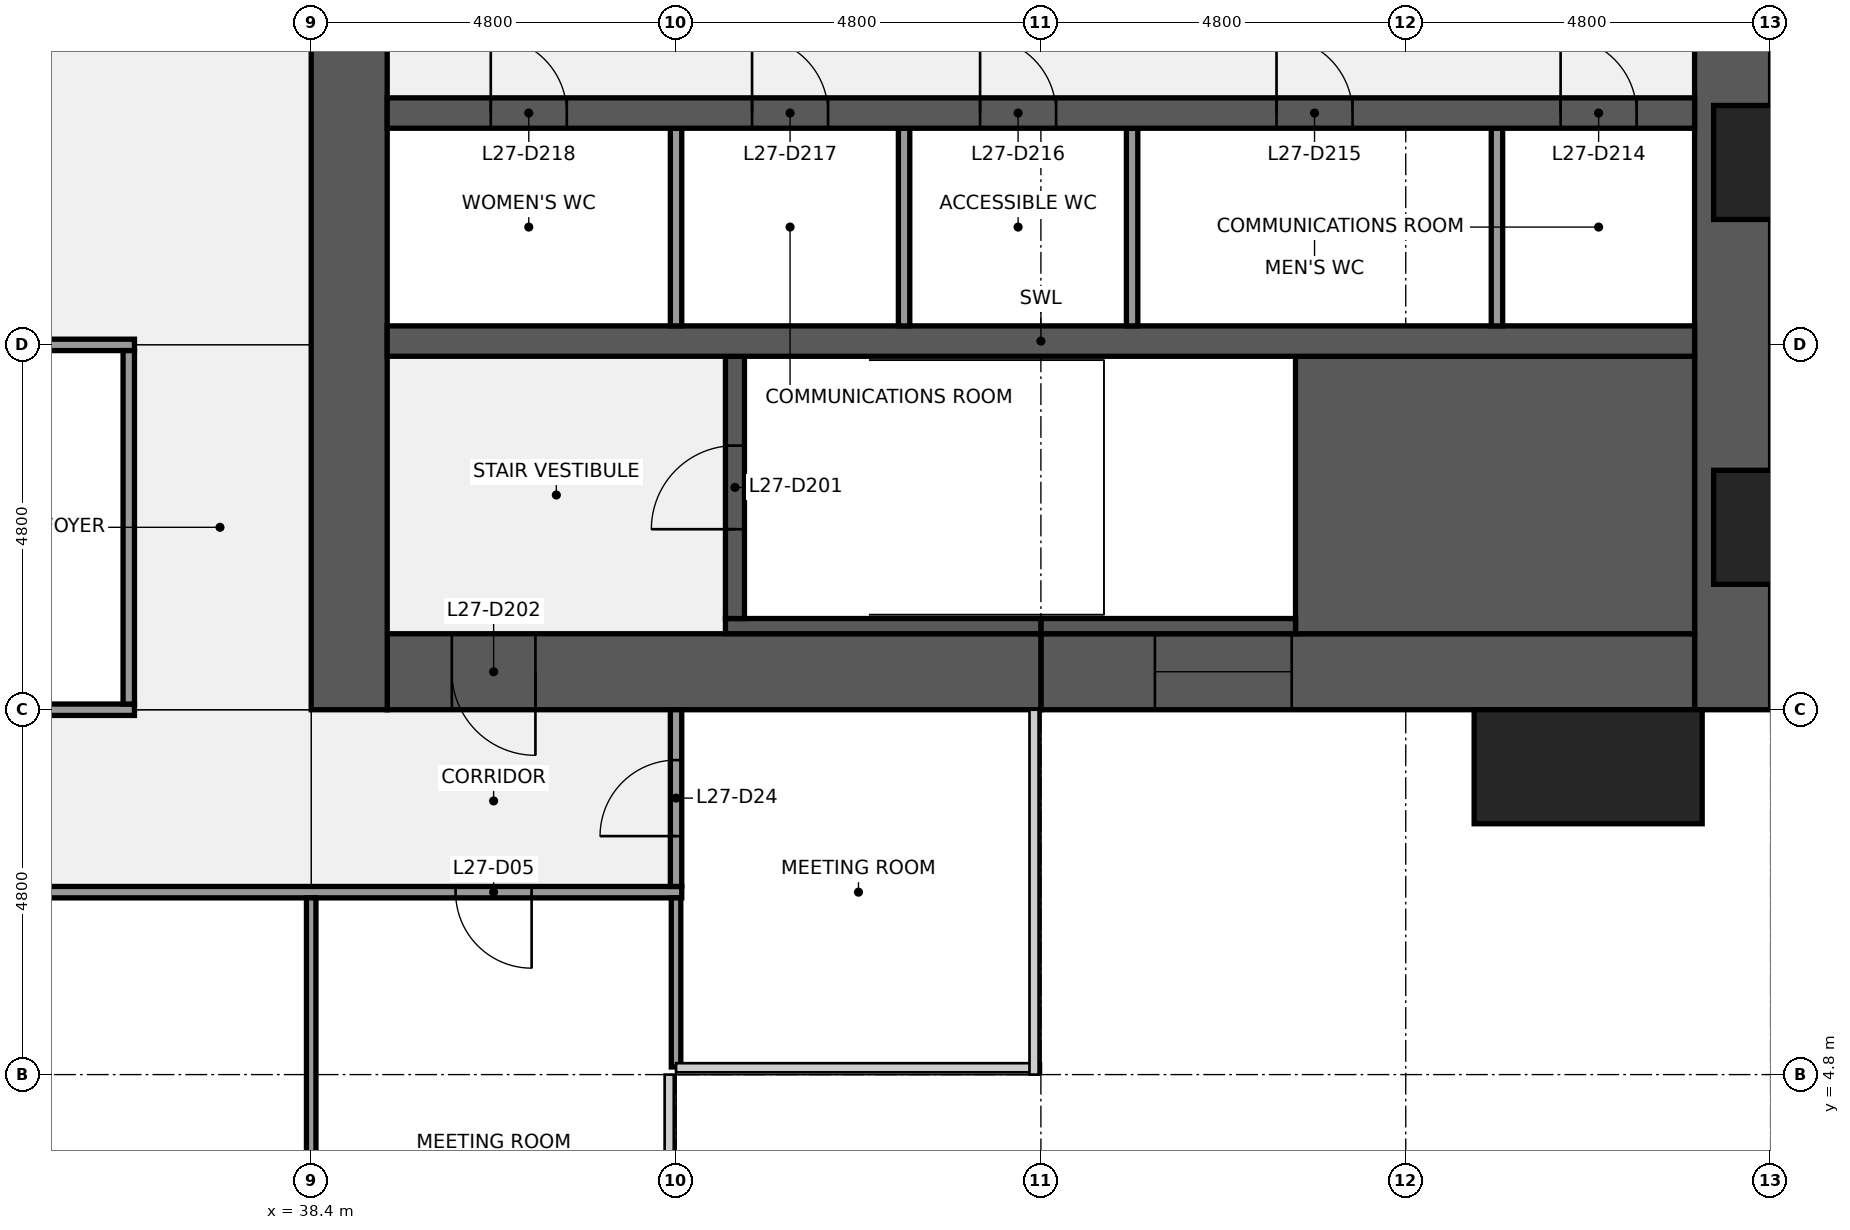
"""IFC4 building model, lengths in metres.
Left out: names, types, materials, properties, quantities, classifications, styles, units other than length and angle.
Written with IfcOpenShell. Run it as: python <this file> out.ifc"""

import sys

from ifc_helpers import new_model, si_unit, direction, frame, frame_2d, origin, origin_2d, place, context, subcontext, project, spatial, rectangle, extrude, element, fill, save


model = new_model("IFC4")
c1 = context("Model", 3, precision=1e-05, world=origin(), true_north=direction((0.0, 1.0)))
c2 = subcontext(c1, "Body", "Model", "MODEL_VIEW")
j1 = project(units=[si_unit("LENGTHUNIT", "METRE"), si_unit("PLANEANGLEUNIT", "RADIAN")], contexts=[c1])
p1 = place(None, origin())
s1 = spatial("IfcSite", under=j1, at=p1, CompositionType="ELEMENT")
p2 = place(p1, origin())
s2 = spatial("IfcBuilding", under=s1, at=p2, CompositionType="ELEMENT")
p3 = place(p2, frame((0.0, 0.0, 128.1)))
s3 = spatial("IfcBuildingStorey", under=s2, at=p3, CompositionType="ELEMENT", Elevation=128.1)
p4 = place(p3, frame((57.1, 38.4, 0.0), z_axis=(0.0, 0.0, 1.0), x_axis=(0.0, -1.0, 0.0)))
e1 = element("IfcWall", 1, at=p4, inside=s3, PredefinedType="SHEAR", context=c2, shape_type="SweptSolid", body=[
    extrude(rectangle(XDim=28.8, YDim=1.0, at=frame_2d((14.4, 0.0))), origin(), (0.0, 0.0, 1.0), 3.84),
])
p5 = place(p4, frame((18.45, 0.0, 0.9)))
e2 = element("IfcOpeningElement", 2, at=p5, cuts=e1, PredefinedType="OPENING", context=c2, shape_type="SweptSolid", body=[
    extrude(rectangle(XDim=1.5, YDim=1.5, at=frame_2d((0.75, 0.75))), frame((0.0, 0.51, 0.0), z_axis=(0.0, -1.0, 0.0), x_axis=(1.0, 0.0, 0.0)), (0.0, 0.0, 1.0), 1.02),
])
p6 = place(p4, frame((8.85, 0.0, 0.9)))
e3 = element("IfcOpeningElement", 3, at=p6, cuts=e1, PredefinedType="OPENING", context=c2, shape_type="SweptSolid", body=[
    extrude(rectangle(XDim=1.5, YDim=1.5, at=frame_2d((0.75, 0.75))), frame((0.0, 0.51, 0.0), z_axis=(0.0, -1.0, 0.0), x_axis=(1.0, 0.0, 0.0)), (0.0, 0.0, 1.0), 1.02),
])
p7 = place(p3, frame((56.6, 10.1, 0.0), z_axis=(0.0, 0.0, 1.0), x_axis=(-1.0, 0.0, 0.0)))
e4 = element("IfcWall", 4, at=p7, inside=s3, PredefinedType="SHEAR", context=c2, shape_type="SweptSolid", body=[
    extrude(rectangle(XDim=8.6, YDim=1.0, at=frame_2d((4.3, 0.0))), origin(), (0.0, 0.0, 1.0), 3.84),
])
p8 = place(p7, frame((5.3, 0.0, 0.9)))
e5 = element("IfcOpeningElement", 5, at=p8, cuts=e4, PredefinedType="OPENING", context=c2, shape_type="SweptSolid", body=[
    extrude(rectangle(XDim=1.8, YDim=1.5, at=frame_2d((0.9, 0.75))), frame((0.0, 0.51, 0.0), z_axis=(0.0, -1.0, 0.0), x_axis=(1.0, 0.0, 0.0)), (0.0, 0.0, 1.0), 1.02),
])
p9 = place(p3, frame((48.0, 10.1, 0.0), z_axis=(0.0, 0.0, 1.0), x_axis=(-1.0, 0.0, 0.0)))
e6 = element("IfcWall", 6, at=p9, inside=s3, PredefinedType="SHEAR", context=c2, shape_type="SweptSolid", body=[
    extrude(rectangle(XDim=8.6, YDim=1.0, at=frame_2d((4.3, 0.0))), origin(), (0.0, 0.0, 1.0), 3.84),
])
p10 = place(p9, frame((6.65, 0.0, 0.0)))
e7 = element("IfcOpeningElement", 7, at=p10, cuts=e6, PredefinedType="OPENING", context=c2, shape_type="SweptSolid", body=[
    extrude(rectangle(XDim=1.1, YDim=2.1, at=frame_2d((0.55, 1.05))), frame((0.0, 0.51, 0.0), z_axis=(0.0, -1.0, 0.0), x_axis=(1.0, 0.0, 0.0)), (0.0, 0.0, 1.0), 1.02),
])
p11 = place(p3, frame((38.9, 9.6, 0.0), z_axis=(0.0, 0.0, 1.0), x_axis=(0.0, 1.0, 0.0)))
e8 = element("IfcWall", 8, at=p11, inside=s3, PredefinedType="SHEAR", context=c2, shape_type="SweptSolid", body=[
    extrude(rectangle(XDim=28.8, YDim=1.0, at=frame_2d((14.4, 0.0))), origin(), (0.0, 0.0, 1.0), 3.84),
])
p12 = place(p11, frame((8.7, 0.0, 0.0)))
e9 = element("IfcOpeningElement", 9, at=p12, cuts=e8, PredefinedType="OPENING", context=c2, shape_type="SweptSolid", body=[
    extrude(rectangle(XDim=1.8, YDim=2.1, at=frame_2d((0.9, 1.05))), frame((0.0, 0.51, 0.0), z_axis=(0.0, -1.0, 0.0), x_axis=(1.0, 0.0, 0.0)), (0.0, 0.0, 1.0), 1.02),
])
p13 = place(p11, frame((18.3, 0.0, 0.0)))
e10 = element("IfcOpeningElement", 10, at=p13, cuts=e8, PredefinedType="OPENING", context=c2, shape_type="SweptSolid", body=[
    extrude(rectangle(XDim=1.8, YDim=2.1, at=frame_2d((0.9, 1.05))), frame((0.0, 0.51, 0.0), z_axis=(0.0, -1.0, 0.0), x_axis=(1.0, 0.0, 0.0)), (0.0, 0.0, 1.0), 1.02),
])
p14 = place(p3, frame((51.35, 12.425, 0.0), z_axis=(0.0, 0.0, 1.0), x_axis=(1.0, 0.0, 0.0)))
e11 = element("IfcWall", 11, at=p14, inside=s3, PredefinedType="SHEAR", context=c2, shape_type="SweptSolid", body=[
    extrude(rectangle(XDim=5.25, YDim=3.65, at=frame_2d((2.625, 0.0))), origin(), (0.0, 0.0, 1.0), 3.84),
])
p15 = place(p3, frame((48.0, 10.7, 0.0), z_axis=(0.0, 0.0, 1.0), x_axis=(1.0, 0.0, 0.0)))
e12 = element("IfcWall", 12, at=p15, inside=s3, PredefinedType="SHEAR", context=c2, shape_type="SweptSolid", body=[
    extrude(rectangle(XDim=3.35, YDim=0.2, at=frame_2d((1.675, 0.0))), origin(), (0.0, 0.0, 1.0), 3.84),
])
p16 = place(p3, frame((43.85, 10.7, 0.0), z_axis=(0.0, 0.0, 1.0), x_axis=(1.0, 0.0, 0.0)))
e13 = element("IfcWall", 13, at=p16, inside=s3, PredefinedType="SHEAR", context=c2, shape_type="SweptSolid", body=[
    extrude(rectangle(XDim=4.15, YDim=0.2, at=frame_2d((2.075, 0.0))), origin(), (0.0, 0.0, 1.0), 3.84),
])
p17 = place(p3, frame((43.975, 10.8, 0.0), z_axis=(0.0, 0.0, 1.0), x_axis=(0.0, 1.0, 0.0)))
e14 = element("IfcWall", 14, at=p17, inside=s3, PredefinedType="SHEAR", context=c2, shape_type="SweptSolid", body=[
    extrude(rectangle(XDim=3.45, YDim=0.25, at=frame_2d((1.725, 0.0))), origin(), (0.0, 0.0, 1.0), 3.84),
])
p18 = place(p17, frame((1.175, 0.0, 0.0)))
e15 = element("IfcOpeningElement", 15, at=p18, cuts=e14, PredefinedType="OPENING", context=c2, shape_type="SweptSolid", body=[
    extrude(rectangle(XDim=1.1, YDim=2.1, at=frame_2d((0.55, 1.05))), frame((0.0, 0.135, 0.0), z_axis=(0.0, -1.0, 0.0), x_axis=(1.0, 0.0, 0.0)), (0.0, 0.0, 1.0), 0.27),
])
p19 = place(p3, frame((39.4, 14.45, 0.0), z_axis=(0.0, 0.0, 1.0), x_axis=(1.0, 0.0, 0.0)))
e16 = element("IfcWall", 16, at=p19, inside=s3, PredefinedType="SHEAR", context=c2, shape_type="SweptSolid", body=[
    extrude(rectangle(XDim=17.2, YDim=0.4, at=frame_2d((8.6, 0.0))), origin(), (0.0, 0.0, 1.0), 3.84),
])
for number, where, z_axis, x_axis in (
    (17, (54.0, 14.65, 0.0), (0.0, 0.0, 1.0), (0.0, 1.0, 0.0)),
    (18, (49.2, 14.65, 0.0), (0.0, 0.0, 1.0), (0.0, 1.0, 0.0)),
    (19, (46.2, 14.65, 0.0), (0.0, 0.0, 1.0), (0.0, 1.0, 0.0)),
    (20, (43.2, 14.65, 0.0), (0.0, 0.0, 1.0), (0.0, 1.0, 0.0)),
):
    element("IfcWall", number, at=place(p3, frame(where, z_axis=z_axis, x_axis=x_axis)), inside=s3, PredefinedType="PARTITIONING", context=c2, shape_type="SweptSolid", body=[
        extrude(rectangle(XDim=2.6, YDim=0.15, at=frame_2d((1.3, 0.0))), origin(), (0.0, 0.0, 1.0), 3.84),
    ])
p20 = place(p3, frame((39.4, 17.45, 0.0), z_axis=(0.0, 0.0, 1.0), x_axis=(1.0, 0.0, 0.0)))
e21 = element("IfcWall", 21, at=p20, inside=s3, PredefinedType="SHEAR", context=c2, shape_type="SweptSolid", body=[
    extrude(rectangle(XDim=17.2, YDim=0.4, at=frame_2d((8.6, 0.0))), origin(), (0.0, 0.0, 1.0), 3.84),
])
p21 = place(p20, frame((15.438, 0.0, 0.0)))
e22 = element("IfcOpeningElement", 22, at=p21, cuts=e21, PredefinedType="OPENING", context=c2, shape_type="SweptSolid", body=[
    extrude(rectangle(XDim=1.0, YDim=2.1, at=frame_2d((0.5, 1.05))), frame((0.0, 0.21, 0.0), z_axis=(0.0, -1.0, 0.0), x_axis=(1.0, 0.0, 0.0)), (0.0, 0.0, 1.0), 0.42),
])
p22 = place(p20, frame((11.7, 0.0, 0.0)))
e23 = element("IfcOpeningElement", 23, at=p22, cuts=e21, PredefinedType="OPENING", context=c2, shape_type="SweptSolid", body=[
    extrude(rectangle(XDim=1.0, YDim=2.1, at=frame_2d((0.5, 1.05))), frame((0.0, 0.21, 0.0), z_axis=(0.0, -1.0, 0.0), x_axis=(1.0, 0.0, 0.0)), (0.0, 0.0, 1.0), 0.42),
])
p23 = place(p20, frame((7.8, 0.0, 0.0)))
e24 = element("IfcOpeningElement", 24, at=p23, cuts=e21, PredefinedType="OPENING", context=c2, shape_type="SweptSolid", body=[
    extrude(rectangle(XDim=1.0, YDim=2.1, at=frame_2d((0.5, 1.05))), frame((0.0, 0.21, 0.0), z_axis=(0.0, -1.0, 0.0), x_axis=(1.0, 0.0, 0.0)), (0.0, 0.0, 1.0), 0.42),
])
p24 = place(p20, frame((4.8, 0.0, 0.0)))
e25 = element("IfcOpeningElement", 25, at=p24, cuts=e21, PredefinedType="OPENING", context=c2, shape_type="SweptSolid", body=[
    extrude(rectangle(XDim=1.0, YDim=2.1, at=frame_2d((0.5, 1.05))), frame((0.0, 0.21, 0.0), z_axis=(0.0, -1.0, 0.0), x_axis=(1.0, 0.0, 0.0)), (0.0, 0.0, 1.0), 0.42),
])
p25 = place(p20, frame((1.363, 0.0, 0.0)))
e26 = element("IfcOpeningElement", 26, at=p25, cuts=e21, PredefinedType="OPENING", context=c2, shape_type="SweptSolid", body=[
    extrude(rectangle(XDim=1.0, YDim=2.1, at=frame_2d((0.5, 1.05))), frame((0.0, 0.21, 0.0), z_axis=(0.0, -1.0, 0.0), x_axis=(1.0, 0.0, 0.0)), (0.0, 0.0, 1.0), 0.42),
])
p26 = place(p3, frame((14.325, 7.2, 0.0), z_axis=(0.0, 0.0, 1.0), x_axis=(1.0, 0.0, 0.0)))
e27 = element("IfcWall", 27, at=p26, inside=s3, PredefinedType="PARTITIONING", context=c2, shape_type="SweptSolid", body=[
    extrude(rectangle(XDim=28.95, YDim=0.15, at=frame_2d((14.475, 0.0))), origin(), (0.0, 0.0, 1.0), 2.936),
])
p27 = place(p26, frame((1.975, 0.0, 0.0)))
e28 = element("IfcOpeningElement", 28, at=p27, cuts=e27, PredefinedType="OPENING", context=c2, shape_type="SweptSolid", body=[
    extrude(rectangle(XDim=1.0, YDim=2.1, at=frame_2d((0.5, 1.05))), frame((0.0, 0.085, 0.0), z_axis=(0.0, -1.0, 0.0), x_axis=(1.0, 0.0, 0.0)), (0.0, 0.0, 1.0), 0.17),
])
p28 = place(p26, frame((5.575, 0.0, 0.0)))
e29 = element("IfcOpeningElement", 29, at=p28, cuts=e27, PredefinedType="OPENING", context=c2, shape_type="SweptSolid", body=[
    extrude(rectangle(XDim=1.0, YDim=2.1, at=frame_2d((0.5, 1.05))), frame((0.0, 0.085, 0.0), z_axis=(0.0, -1.0, 0.0), x_axis=(1.0, 0.0, 0.0)), (0.0, 0.0, 1.0), 0.17),
])
p29 = place(p26, frame((9.175, 0.0, 0.0)))
e30 = element("IfcOpeningElement", 30, at=p29, cuts=e27, PredefinedType="OPENING", context=c2, shape_type="SweptSolid", body=[
    extrude(rectangle(XDim=1.0, YDim=2.1, at=frame_2d((0.5, 1.05))), frame((0.0, 0.085, 0.0), z_axis=(0.0, -1.0, 0.0), x_axis=(1.0, 0.0, 0.0)), (0.0, 0.0, 1.0), 0.17),
])
p30 = place(p26, frame((17.575, 0.0, 0.0)))
e31 = element("IfcOpeningElement", 31, at=p30, cuts=e27, PredefinedType="OPENING", context=c2, shape_type="SweptSolid", body=[
    extrude(rectangle(XDim=1.0, YDim=2.1, at=frame_2d((0.5, 1.05))), frame((0.0, 0.085, 0.0), z_axis=(0.0, -1.0, 0.0), x_axis=(1.0, 0.0, 0.0)), (0.0, 0.0, 1.0), 0.17),
])
p31 = place(p26, frame((25.975, 0.0, 0.0)))
e32 = element("IfcOpeningElement", 32, at=p31, cuts=e27, PredefinedType="OPENING", context=c2, shape_type="SweptSolid", body=[
    extrude(rectangle(XDim=1.0, YDim=2.1, at=frame_2d((0.5, 1.05))), frame((0.0, 0.085, 0.0), z_axis=(0.0, -1.0, 0.0), x_axis=(1.0, 0.0, 0.0)), (0.0, 0.0, 1.0), 0.17),
])
p32 = place(p3, frame((21.525, 9.6, 0.0), z_axis=(0.0, 0.0, 1.0), x_axis=(1.0, 0.0, 0.0)))
e33 = element("IfcWall", 33, at=p32, inside=s3, PredefinedType="PARTITIONING", context=c2, shape_type="SweptSolid", body=[
    extrude(rectangle(XDim=14.55, YDim=0.15, at=frame_2d((7.275, 0.0))), origin(), (0.0, 0.0, 1.0), 2.936),
])
p33 = place(p32, frame((6.775, 0.0, 0.0)))
e34 = element("IfcOpeningElement", 34, at=p33, cuts=e33, PredefinedType="OPENING", context=c2, shape_type="SweptSolid", body=[
    extrude(rectangle(XDim=1.0, YDim=2.1, at=frame_2d((0.5, 1.05))), frame((0.0, 0.085, 0.0), z_axis=(0.0, -1.0, 0.0), x_axis=(1.0, 0.0, 0.0)), (0.0, 0.0, 1.0), 0.17),
])
p34 = place(p32, frame((11.575, 0.0, 0.0)))
e35 = element("IfcOpeningElement", 35, at=p34, cuts=e33, PredefinedType="OPENING", context=c2, shape_type="SweptSolid", body=[
    extrude(rectangle(XDim=1.0, YDim=2.1, at=frame_2d((0.5, 1.05))), frame((0.0, 0.085, 0.0), z_axis=(0.0, -1.0, 0.0), x_axis=(1.0, 0.0, 0.0)), (0.0, 0.0, 1.0), 0.17),
])
p35 = place(p3, frame((31.275, 14.4, 0.0), z_axis=(0.0, 0.0, 1.0), x_axis=(1.0, 0.0, 0.0)))
e36 = element("IfcWall", 36, at=p35, inside=s3, PredefinedType="PARTITIONING", context=c2, shape_type="SweptSolid", body=[
    extrude(rectangle(XDim=4.8, YDim=0.15, at=frame_2d((2.4, 0.0))), origin(), (0.0, 0.0, 1.0), 2.936),
])
p36 = place(p3, frame((36.0, 9.675, 0.0), z_axis=(0.0, 0.0, 1.0), x_axis=(0.0, 1.0, 0.0)))
e37 = element("IfcWall", 37, at=p36, inside=s3, PredefinedType="PARTITIONING", context=c2, shape_type="SweptSolid", body=[
    extrude(rectangle(XDim=4.65, YDim=0.15, at=frame_2d((2.325, 0.0))), origin(), (0.0, 0.0, 1.0), 2.936),
])
p37 = place(p3, frame((38.4, 0.6, 0.0), z_axis=(0.0, 0.0, 1.0), x_axis=(0.0, 1.0, 0.0)))
e38 = element("IfcWall", 38, at=p37, inside=s3, PredefinedType="PARTITIONING", context=c2, shape_type="SweptSolid", body=[
    extrude(rectangle(XDim=6.525, YDim=0.125, at=frame_2d((3.262, 0.0))), origin(), (0.0, 0.0, 1.0), 2.936),
])
p38 = place(p3, frame((43.2, 4.9, 0.0), z_axis=(0.0, 0.0, 1.0), x_axis=(0.0, 1.0, 0.0)))
e39 = element("IfcWall", 39, at=p38, inside=s3, PredefinedType="PARTITIONING", context=c2, shape_type="SweptSolid", body=[
    extrude(rectangle(XDim=2.225, YDim=0.125, at=frame_2d((1.113, 0.0))), origin(), (0.0, 0.0, 1.0), 2.936),
])
p39 = place(p3, frame((43.2, 7.275, 0.0), z_axis=(0.0, 0.0, 1.0), x_axis=(0.0, 1.0, 0.0)))
e40 = element("IfcWall", 40, at=p39, inside=s3, PredefinedType="PARTITIONING", context=c2, shape_type="SweptSolid", body=[
    extrude(rectangle(XDim=2.325, YDim=0.15, at=frame_2d((1.163, 0.0))), origin(), (0.0, 0.0, 1.0), 2.936),
])
p40 = place(p39, frame((0.663, 0.0, 0.0)))
e41 = element("IfcOpeningElement", 41, at=p40, cuts=e40, PredefinedType="OPENING", context=c2, shape_type="SweptSolid", body=[
    extrude(rectangle(XDim=1.0, YDim=2.1, at=frame_2d((0.5, 1.05))), frame((0.0, 0.085, 0.0), z_axis=(0.0, -1.0, 0.0), x_axis=(1.0, 0.0, 0.0)), (0.0, 0.0, 1.0), 0.17),
])
p41 = place(p3, frame((55.2, 8.85, 0.0), z_axis=(0.0, 0.0, 1.0), x_axis=(1.0, 0.0, 0.0)))
e42 = element("IfcColumn", 42, at=p41, inside=s3, PredefinedType="PILASTER", context=c2, shape_type="SweptSolid", body=[
    extrude(rectangle(XDim=3.0, YDim=1.5, at=origin_2d()), origin(), (0.0, 0.0, 1.0), 4.0),
])
p42 = place(p18, origin())
e43 = element("IfcDoor", 43, at=p42, inside=s3, OperationType="SINGLE_SWING_LEFT", PredefinedType="DOOR", context=c2, shape_type="SweptSolid", body=[
    extrude(rectangle(XDim=1.1, YDim=2.1, at=frame_2d((0.55, 1.05))), frame((0.0, 0.025, 0.0), z_axis=(0.0, -1.0, 0.0), x_axis=(1.0, 0.0, 0.0)), (0.0, 0.0, 1.0), 0.05),
])
fill(e15, e43)
p43 = place(p10, origin())
e44 = element("IfcDoor", 44, at=p43, inside=s3, OperationType="SINGLE_SWING_LEFT", PredefinedType="DOOR", context=c2, shape_type="SweptSolid", body=[
    extrude(rectangle(XDim=1.1, YDim=2.1, at=frame_2d((0.55, 1.05))), frame((0.0, 0.025, 0.0), z_axis=(0.0, -1.0, 0.0), x_axis=(1.0, 0.0, 0.0)), (0.0, 0.0, 1.0), 0.05),
])
fill(e7, e44)
p44 = place(p21, origin())
e45 = element("IfcDoor", 45, at=p44, inside=s3, OperationType="SINGLE_SWING_LEFT", PredefinedType="DOOR", context=c2, shape_type="SweptSolid", body=[
    extrude(rectangle(XDim=1.0, YDim=2.1, at=frame_2d((0.5, 1.05))), frame((0.0, 0.025, 0.0), z_axis=(0.0, -1.0, 0.0), x_axis=(1.0, 0.0, 0.0)), (0.0, 0.0, 1.0), 0.05),
])
fill(e22, e45)
p45 = place(p22, origin())
e46 = element("IfcDoor", 46, at=p45, inside=s3, OperationType="SINGLE_SWING_LEFT", PredefinedType="DOOR", context=c2, shape_type="SweptSolid", body=[
    extrude(rectangle(XDim=1.0, YDim=2.1, at=frame_2d((0.5, 1.05))), frame((0.0, 0.025, 0.0), z_axis=(0.0, -1.0, 0.0), x_axis=(1.0, 0.0, 0.0)), (0.0, 0.0, 1.0), 0.05),
])
fill(e23, e46)
p46 = place(p23, origin())
e47 = element("IfcDoor", 47, at=p46, inside=s3, OperationType="SINGLE_SWING_LEFT", PredefinedType="DOOR", context=c2, shape_type="SweptSolid", body=[
    extrude(rectangle(XDim=1.0, YDim=2.1, at=frame_2d((0.5, 1.05))), frame((0.0, 0.025, 0.0), z_axis=(0.0, -1.0, 0.0), x_axis=(1.0, 0.0, 0.0)), (0.0, 0.0, 1.0), 0.05),
])
fill(e24, e47)
p47 = place(p24, origin())
e48 = element("IfcDoor", 48, at=p47, inside=s3, OperationType="SINGLE_SWING_LEFT", PredefinedType="DOOR", context=c2, shape_type="SweptSolid", body=[
    extrude(rectangle(XDim=1.0, YDim=2.1, at=frame_2d((0.5, 1.05))), frame((0.0, 0.025, 0.0), z_axis=(0.0, -1.0, 0.0), x_axis=(1.0, 0.0, 0.0)), (0.0, 0.0, 1.0), 0.05),
])
fill(e25, e48)
p48 = place(p25, origin())
e49 = element("IfcDoor", 49, at=p48, inside=s3, OperationType="SINGLE_SWING_LEFT", PredefinedType="DOOR", context=c2, shape_type="SweptSolid", body=[
    extrude(rectangle(XDim=1.0, YDim=2.1, at=frame_2d((0.5, 1.05))), frame((0.0, 0.025, 0.0), z_axis=(0.0, -1.0, 0.0), x_axis=(1.0, 0.0, 0.0)), (0.0, 0.0, 1.0), 0.05),
])
fill(e26, e49)
p49 = place(p8, origin())
e50 = element("IfcWindow", 50, at=p49, inside=s3, PartitioningType="SINGLE_PANEL", PredefinedType="WINDOW", context=c2, shape_type="SweptSolid", body=[
    extrude(rectangle(XDim=1.8, YDim=1.5, at=frame_2d((0.9, 0.75))), frame((0.0, 0.03, 0.0), z_axis=(0.0, -1.0, 0.0), x_axis=(1.0, 0.0, 0.0)), (0.0, 0.0, 1.0), 0.06),
])
fill(e5, e50)
p50 = place(p31, origin())
e51 = element("IfcDoor", 51, at=p50, inside=s3, OperationType="SINGLE_SWING_RIGHT", PredefinedType="DOOR", context=c2, shape_type="SweptSolid", body=[
    extrude(rectangle(XDim=1.0, YDim=2.1, at=frame_2d((0.5, 1.05))), frame((0.0, 0.025, 0.0), z_axis=(0.0, -1.0, 0.0), x_axis=(1.0, 0.0, 0.0)), (0.0, 0.0, 1.0), 0.05),
])
fill(e32, e51)
p51 = place(p40, origin())
e52 = element("IfcDoor", 52, at=p51, inside=s3, OperationType="SINGLE_SWING_LEFT", PredefinedType="DOOR", context=c2, shape_type="SweptSolid", body=[
    extrude(rectangle(XDim=1.0, YDim=2.1, at=frame_2d((0.5, 1.05))), frame((0.0, 0.025, 0.0), z_axis=(0.0, -1.0, 0.0), x_axis=(1.0, 0.0, 0.0)), (0.0, 0.0, 1.0), 0.05),
])
fill(e41, e52)
save(model, sys.argv[1])
